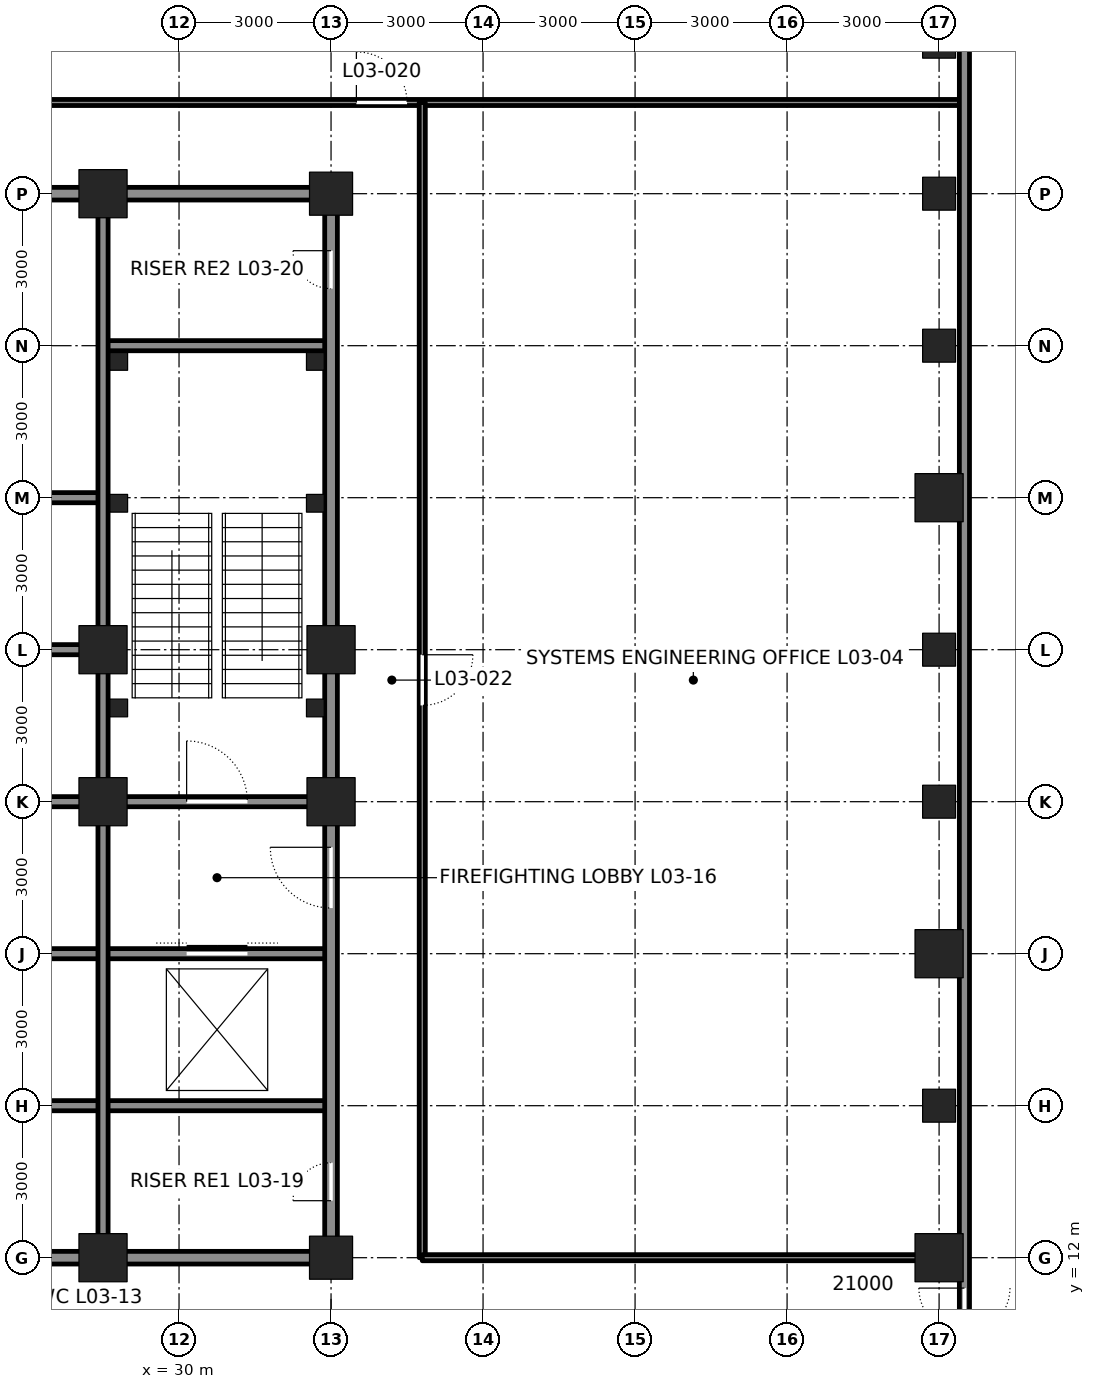
"""IFC4 building model, lengths in metres.
Left out: names, types, materials, properties, quantities, classifications, styles, units other than length and angle.
Written with IfcOpenShell. Run it as: python <this file> out.ifc"""

import sys

from ifc_helpers import new_model, si_unit, direction, frame, frame_2d, origin, origin_2d, place, context, subcontext, project, spatial, rectangle, hollow_rectangle, extrude, element, fill, save


model = new_model("IFC4")
c1 = context("Model", 3, precision=1e-05, world=origin(), true_north=direction((0.0, 1.0)))
c2 = subcontext(c1, "Body", "Model", "MODEL_VIEW")
j1 = project(units=[si_unit("LENGTHUNIT", "METRE"), si_unit("PLANEANGLEUNIT", "RADIAN")], contexts=[c1])
p1 = place(None, origin())
s1 = spatial("IfcSite", under=j1, at=p1, CompositionType="ELEMENT")
p2 = place(p1, origin())
s2 = spatial("IfcBuilding", under=s1, at=p2, CompositionType="ELEMENT")
p3 = place(p2, frame((0.0, 0.0, 19.5)))
s3 = spatial("IfcBuildingStorey", under=s2, at=p3, CompositionType="ELEMENT", Elevation=19.5)
p4 = place(p3, frame((45.0, 12.0, 0.0), z_axis=(0.0, 0.0, 1.0), x_axis=(1.0, 0.0, 0.0)))
e1 = element("IfcColumn", 1, at=p4, inside=s3, PredefinedType="COLUMN", context=c2, shape_type="SweptSolid", body=[
    extrude(hollow_rectangle(XDim=0.95, YDim=0.95, WallThickness=0.11, at=origin_2d()), origin(), (0.0, 0.0, 1.0), 4.8),
])
p5 = place(p3, frame((45.0, 15.0, 0.0), z_axis=(0.0, 0.0, 1.0), x_axis=(1.0, 0.0, 0.0)))
e2 = element("IfcColumn", 2, at=p5, inside=s3, PredefinedType="COLUMN", context=c2, shape_type="SweptSolid", body=[
    extrude(hollow_rectangle(XDim=0.65, YDim=0.65, WallThickness=0.065, at=origin_2d()), origin(), (0.0, 0.0, 1.0), 4.8),
])
p6 = place(p3, frame((45.0, 18.0, 0.0), z_axis=(0.0, 0.0, 1.0), x_axis=(1.0, 0.0, 0.0)))
e3 = element("IfcColumn", 3, at=p6, inside=s3, PredefinedType="COLUMN", context=c2, shape_type="SweptSolid", body=[
    extrude(hollow_rectangle(XDim=0.95, YDim=0.95, WallThickness=0.11, at=origin_2d()), origin(), (0.0, 0.0, 1.0), 4.8),
])
for number, where, z_axis, x_axis in (
    (4, (45.0, 21.0, 0.0), (0.0, 0.0, 1.0), (1.0, 0.0, 0.0)),
    (5, (45.0, 24.0, 0.0), (0.0, 0.0, 1.0), (1.0, 0.0, 0.0)),
):
    element("IfcColumn", number, at=place(p3, frame(where, z_axis=z_axis, x_axis=x_axis)), inside=s3, PredefinedType="COLUMN", context=c2, shape_type="SweptSolid", body=[
        extrude(hollow_rectangle(XDim=0.65, YDim=0.65, WallThickness=0.065, at=origin_2d()), origin(), (0.0, 0.0, 1.0), 4.8),
    ])
p7 = place(p3, frame((45.0, 27.0, 0.0), z_axis=(0.0, 0.0, 1.0), x_axis=(1.0, 0.0, 0.0)))
e6 = element("IfcColumn", 6, at=p7, inside=s3, PredefinedType="COLUMN", context=c2, shape_type="SweptSolid", body=[
    extrude(hollow_rectangle(XDim=0.95, YDim=0.95, WallThickness=0.11, at=origin_2d()), origin(), (0.0, 0.0, 1.0), 4.8),
])
for number, where, z_axis, x_axis in (
    (7, (45.0, 30.0, 0.0), (0.0, 0.0, 1.0), (1.0, 0.0, 0.0)),
    (8, (45.0, 33.0, 0.0), (0.0, 0.0, 1.0), (1.0, 0.0, 0.0)),
    (9, (45.0, 36.0, 0.0), (0.0, 0.0, 1.0), (1.0, 0.0, 0.0)),
):
    element("IfcColumn", number, at=place(p3, frame(where, z_axis=z_axis, x_axis=x_axis)), inside=s3, PredefinedType="COLUMN", context=c2, shape_type="SweptSolid", body=[
        extrude(hollow_rectangle(XDim=0.65, YDim=0.65, WallThickness=0.065, at=origin_2d()), origin(), (0.0, 0.0, 1.0), 4.8),
    ])
p8 = place(p3, frame((28.5, 12.0, 0.0), z_axis=(0.0, 0.0, 1.0), x_axis=(1.0, 0.0, 0.0)))
e10 = element("IfcColumn", 10, at=p8, inside=s3, PredefinedType="COLUMN", context=c2, shape_type="SweptSolid", body=[
    extrude(hollow_rectangle(XDim=0.95, YDim=0.95, WallThickness=0.095, at=origin_2d()), origin(), (0.0, 0.0, 1.0), 4.8),
])
p9 = place(p3, frame((33.0, 12.0, 0.0), z_axis=(0.0, 0.0, 1.0), x_axis=(1.0, 0.0, 0.0)))
e11 = element("IfcColumn", 11, at=p9, inside=s3, PredefinedType="COLUMN", context=c2, shape_type="SweptSolid", body=[
    extrude(hollow_rectangle(XDim=0.85, YDim=0.85, WallThickness=0.085, at=origin_2d()), origin(), (0.0, 0.0, 1.0), 4.8),
])
p10 = place(p3, frame((28.5, 33.0, 0.0), z_axis=(0.0, 0.0, 1.0), x_axis=(1.0, 0.0, 0.0)))
e12 = element("IfcColumn", 12, at=p10, inside=s3, PredefinedType="COLUMN", context=c2, shape_type="SweptSolid", body=[
    extrude(hollow_rectangle(XDim=0.95, YDim=0.95, WallThickness=0.095, at=origin_2d()), origin(), (0.0, 0.0, 1.0), 4.8),
])
p11 = place(p3, frame((33.0, 33.0, 0.0), z_axis=(0.0, 0.0, 1.0), x_axis=(1.0, 0.0, 0.0)))
e13 = element("IfcColumn", 13, at=p11, inside=s3, PredefinedType="COLUMN", context=c2, shape_type="SweptSolid", body=[
    extrude(hollow_rectangle(XDim=0.85, YDim=0.85, WallThickness=0.085, at=origin_2d()), origin(), (0.0, 0.0, 1.0), 4.8),
])
for number, where, z_axis, x_axis in (
    (14, (33.0, 21.0, 0.0), (0.0, 0.0, 1.0), (1.0, 0.0, 0.0)),
    (15, (33.0, 24.0, 0.0), (0.0, 0.0, 1.0), (1.0, 0.0, 0.0)),
    (16, (28.5, 21.0, 0.0), (0.0, 0.0, 1.0), (1.0, 0.0, 0.0)),
    (17, (28.5, 24.0, 0.0), (0.0, 0.0, 1.0), (1.0, 0.0, 0.0)),
):
    element("IfcColumn", number, at=place(p3, frame(where, z_axis=z_axis, x_axis=x_axis)), inside=s3, PredefinedType="COLUMN", context=c2, shape_type="SweptSolid", body=[
        extrude(hollow_rectangle(XDim=0.95, YDim=0.95, WallThickness=0.095, at=origin_2d()), origin(), (0.0, 0.0, 1.0), 4.8),
    ])
p12 = place(p3, frame((25.75, 12.0, 0.0), z_axis=(0.0, 0.0, 1.0), x_axis=(1.0, 0.0, 0.0)))
e18 = element("IfcWall", 18, at=p12, inside=s3, PredefinedType="SOLIDWALL", context=c2, shape_type="SweptSolid", body=[
    extrude(rectangle(XDim=2.5, YDim=0.25, at=frame_2d((1.25, 0.0))), origin(), (0.0, 0.0, 1.0), 3.481),
])
p13 = place(p3, frame((28.75, 12.0, 0.0), z_axis=(0.0, 0.0, 1.0), x_axis=(1.0, 0.0, 0.0)))
e19 = element("IfcWall", 19, at=p13, inside=s3, PredefinedType="SOLIDWALL", context=c2, shape_type="SweptSolid", body=[
    extrude(rectangle(XDim=4.0, YDim=0.25, at=frame_2d((2.0, 0.0))), origin(), (0.0, 0.0, 1.0), 3.481),
])
p14 = place(p3, frame((25.5, 15.0, 0.0), z_axis=(0.0, 0.0, 1.0), x_axis=(1.0, 0.0, 0.0)))
e20 = element("IfcWall", 20, at=p14, inside=s3, PredefinedType="SOLIDWALL", context=c2, shape_type="SweptSolid", body=[
    extrude(rectangle(XDim=7.5, YDim=0.2, at=frame_2d((3.75, 0.0))), origin(), (0.0, 0.0, 1.0), 4.64),
])
p15 = place(p3, frame((25.5, 24.0, 0.0), z_axis=(0.0, 0.0, 1.0), x_axis=(1.0, 0.0, 0.0)))
e21 = element("IfcWall", 21, at=p15, inside=s3, PredefinedType="SOLIDWALL", context=c2, shape_type="SweptSolid", body=[
    extrude(rectangle(XDim=2.75, YDim=0.2, at=frame_2d((1.375, 0.0))), origin(), (0.0, 0.0, 1.0), 3.69),
])
p16 = place(p3, frame((25.5, 27.0, 0.0), z_axis=(0.0, 0.0, 1.0), x_axis=(1.0, 0.0, 0.0)))
e22 = element("IfcWall", 22, at=p16, inside=s3, PredefinedType="SOLIDWALL", context=c2, shape_type="SweptSolid", body=[
    extrude(rectangle(XDim=3.0, YDim=0.2, at=frame_2d((1.5, 0.0))), origin(), (0.0, 0.0, 1.0), 4.64),
])
p17 = place(p3, frame((28.5, 30.0, 0.0), z_axis=(0.0, 0.0, 1.0), x_axis=(1.0, 0.0, 0.0)))
e23 = element("IfcWall", 23, at=p17, inside=s3, PredefinedType="SOLIDWALL", context=c2, shape_type="SweptSolid", body=[
    extrude(rectangle(XDim=4.5, YDim=0.2, at=frame_2d((2.25, 0.0))), origin(), (0.0, 0.0, 1.0), 4.64),
])
p18 = place(p3, frame((25.75, 33.0, 0.0), z_axis=(0.0, 0.0, 1.0), x_axis=(1.0, 0.0, 0.0)))
e24 = element("IfcWall", 24, at=p18, inside=s3, PredefinedType="SOLIDWALL", context=c2, shape_type="SweptSolid", body=[
    extrude(rectangle(XDim=2.5, YDim=0.25, at=frame_2d((1.25, 0.0))), origin(), (0.0, 0.0, 1.0), 3.481),
])
p19 = place(p3, frame((28.75, 33.0, 0.0), z_axis=(0.0, 0.0, 1.0), x_axis=(1.0, 0.0, 0.0)))
e25 = element("IfcWall", 25, at=p19, inside=s3, PredefinedType="SOLIDWALL", context=c2, shape_type="SweptSolid", body=[
    extrude(rectangle(XDim=4.0, YDim=0.25, at=frame_2d((2.0, 0.0))), origin(), (0.0, 0.0, 1.0), 3.481),
])
p20 = place(p3, frame((25.5, 18.0, 0.0), z_axis=(0.0, 0.0, 1.0), x_axis=(1.0, 0.0, 0.0)))
e26 = element("IfcWall", 26, at=p20, inside=s3, PredefinedType="SOLIDWALL", context=c2, shape_type="SweptSolid", body=[
    extrude(rectangle(XDim=7.5, YDim=0.2, at=frame_2d((3.75, 0.0))), origin(), (0.0, 0.0, 1.0), 4.64),
])
p21 = place(p20, frame((4.65, 0.0, 0.0)))
e27 = element("IfcOpeningElement", 27, at=p21, cuts=e26, PredefinedType="OPENING", context=c2, shape_type="SweptSolid", body=[
    extrude(rectangle(XDim=1.2, YDim=2.1, at=frame_2d((0.6, 1.05))), frame((0.0, 0.11, 0.0), z_axis=(0.0, -1.0, 0.0), x_axis=(1.0, 0.0, 0.0)), (0.0, 0.0, 1.0), 0.22),
])
p22 = place(p3, frame((25.5, 21.0, 0.0), z_axis=(0.0, 0.0, 1.0), x_axis=(1.0, 0.0, 0.0)))
e28 = element("IfcWall", 28, at=p22, inside=s3, PredefinedType="SOLIDWALL", context=c2, shape_type="SweptSolid", body=[
    extrude(rectangle(XDim=2.75, YDim=0.2, at=frame_2d((1.375, 0.0))), origin(), (0.0, 0.0, 1.0), 3.69),
])
p23 = place(p3, frame((28.75, 21.0, 0.0), z_axis=(0.0, 0.0, 1.0), x_axis=(1.0, 0.0, 0.0)))
e29 = element("IfcWall", 29, at=p23, inside=s3, PredefinedType="SOLIDWALL", context=c2, shape_type="SweptSolid", body=[
    extrude(rectangle(XDim=4.0, YDim=0.2, at=frame_2d((2.0, 0.0))), origin(), (0.0, 0.0, 1.0), 3.69),
])
p24 = place(p23, frame((1.4, 0.0, 0.0)))
e30 = element("IfcOpeningElement", 30, at=p24, cuts=e29, PredefinedType="OPENING", context=c2, shape_type="SweptSolid", body=[
    extrude(rectangle(XDim=1.2, YDim=2.1, at=frame_2d((0.6, 1.05))), frame((0.0, 0.11, 0.0), z_axis=(0.0, -1.0, 0.0), x_axis=(1.0, 0.0, 0.0)), (0.0, 0.0, 1.0), 0.22),
])
p25 = place(p3, frame((28.5, 12.25, 0.0), z_axis=(0.0, 0.0, 1.0), x_axis=(0.0, 1.0, 0.0)))
e31 = element("IfcWall", 31, at=p25, inside=s3, PredefinedType="SOLIDWALL", context=c2, shape_type="SweptSolid", body=[
    extrude(rectangle(XDim=8.5, YDim=0.2, at=frame_2d((4.25, 0.0))), origin(), (0.0, 0.0, 1.0), 3.713),
])
p26 = place(p3, frame((28.5, 21.25, 0.0), z_axis=(0.0, 0.0, 1.0), x_axis=(0.0, 1.0, 0.0)))
e32 = element("IfcWall", 32, at=p26, inside=s3, PredefinedType="SOLIDWALL", context=c2, shape_type="SweptSolid", body=[
    extrude(rectangle(XDim=2.5, YDim=0.2, at=frame_2d((1.25, 0.0))), origin(), (0.0, 0.0, 1.0), 3.713),
])
p27 = place(p3, frame((28.5, 24.25, 0.0), z_axis=(0.0, 0.0, 1.0), x_axis=(0.0, 1.0, 0.0)))
e33 = element("IfcWall", 33, at=p27, inside=s3, PredefinedType="SOLIDWALL", context=c2, shape_type="SweptSolid", body=[
    extrude(rectangle(XDim=8.5, YDim=0.2, at=frame_2d((4.25, 0.0))), origin(), (0.0, 0.0, 1.0), 3.713),
])
p28 = place(p3, frame((33.0, 12.25, 0.0), z_axis=(0.0, 0.0, 1.0), x_axis=(0.0, 1.0, 0.0)))
e34 = element("IfcWall", 34, at=p28, inside=s3, PredefinedType="SOLIDWALL", context=c2, shape_type="SweptSolid", body=[
    extrude(rectangle(XDim=8.5, YDim=0.25, at=frame_2d((4.25, 0.0))), origin(), (0.0, 0.0, 1.0), 3.413),
])
p29 = place(p28, frame((6.65, 0.0, 0.0)))
e35 = element("IfcOpeningElement", 35, at=p29, cuts=e34, PredefinedType="OPENING", context=c2, shape_type="SweptSolid", body=[
    extrude(rectangle(XDim=1.2, YDim=2.1, at=frame_2d((0.6, 1.05))), frame((0.0, 0.135, 0.0), z_axis=(0.0, -1.0, 0.0), x_axis=(1.0, 0.0, 0.0)), (0.0, 0.0, 1.0), 0.27),
])
p30 = place(p28, frame((0.875, 0.0, 0.0)))
e36 = element("IfcOpeningElement", 36, at=p30, cuts=e34, PredefinedType="OPENING", context=c2, shape_type="SweptSolid", body=[
    extrude(rectangle(XDim=0.75, YDim=2.1, at=frame_2d((0.375, 1.05))), frame((0.0, 0.135, 0.0), z_axis=(0.0, -1.0, 0.0), x_axis=(1.0, 0.0, 0.0)), (0.0, 0.0, 1.0), 0.27),
])
p31 = place(p3, frame((33.0, 21.25, 0.0), z_axis=(0.0, 0.0, 1.0), x_axis=(0.0, 1.0, 0.0)))
e37 = element("IfcWall", 37, at=p31, inside=s3, PredefinedType="SOLIDWALL", context=c2, shape_type="SweptSolid", body=[
    extrude(rectangle(XDim=2.5, YDim=0.25, at=frame_2d((1.25, 0.0))), origin(), (0.0, 0.0, 1.0), 3.413),
])
p32 = place(p3, frame((33.0, 24.25, 0.0), z_axis=(0.0, 0.0, 1.0), x_axis=(0.0, 1.0, 0.0)))
e38 = element("IfcWall", 38, at=p32, inside=s3, PredefinedType="SOLIDWALL", context=c2, shape_type="SweptSolid", body=[
    extrude(rectangle(XDim=8.5, YDim=0.25, at=frame_2d((4.25, 0.0))), origin(), (0.0, 0.0, 1.0), 3.413),
])
p33 = place(p32, frame((6.875, 0.0, 0.0)))
e39 = element("IfcOpeningElement", 39, at=p33, cuts=e38, PredefinedType="OPENING", context=c2, shape_type="SweptSolid", body=[
    extrude(rectangle(XDim=0.75, YDim=2.1, at=frame_2d((0.375, 1.05))), frame((0.0, 0.135, 0.0), z_axis=(0.0, -1.0, 0.0), x_axis=(1.0, 0.0, 0.0)), (0.0, 0.0, 1.0), 0.27),
])
p34 = place(p3, frame((22.5, 34.8, 0.0), z_axis=(0.0, 0.0, 1.0), x_axis=(1.0, 0.0, 0.0)))
e40 = element("IfcWall", 40, at=p34, inside=s3, PredefinedType="PARTITIONING", context=c2, shape_type="SweptSolid", body=[
    extrude(rectangle(XDim=23.0, YDim=0.12, at=frame_2d((11.5, 0.0))), origin(), (0.0, 0.0, 1.0), 4.34),
])
p35 = place(p34, frame((11.0, 0.0, 0.0)))
e41 = element("IfcOpeningElement", 41, at=p35, cuts=e40, PredefinedType="OPENING", context=c2, shape_type="SweptSolid", body=[
    extrude(rectangle(XDim=1.0, YDim=2.4, at=frame_2d((0.5, 1.2))), frame((0.0, 0.07, 0.0), z_axis=(0.0, -1.0, 0.0), x_axis=(1.0, 0.0, 0.0)), (0.0, 0.0, 1.0), 0.14),
])
p36 = place(p3, frame((34.8, 12.0, 0.0), z_axis=(0.0, 0.0, 1.0), x_axis=(0.0, 1.0, 0.0)))
e42 = element("IfcWall", 42, at=p36, inside=s3, PredefinedType="PARTITIONING", context=c2, shape_type="SweptSolid", body=[
    extrude(rectangle(XDim=22.8, YDim=0.12, at=frame_2d((11.4, 0.0))), origin(), (0.0, 0.0, 1.0), 4.34),
])
p37 = place(p36, frame((10.9, 0.0, 0.0)))
e43 = element("IfcOpeningElement", 43, at=p37, cuts=e42, PredefinedType="OPENING", context=c2, shape_type="SweptSolid", body=[
    extrude(rectangle(XDim=1.0, YDim=2.4, at=frame_2d((0.5, 1.2))), frame((0.0, 0.07, 0.0), z_axis=(0.0, -1.0, 0.0), x_axis=(1.0, 0.0, 0.0)), (0.0, 0.0, 1.0), 0.14),
])
p38 = place(p3, frame((34.8, 12.0, 0.0), z_axis=(0.0, 0.0, 1.0), x_axis=(1.0, 0.0, 0.0)))
e44 = element("IfcWall", 44, at=p38, inside=s3, PredefinedType="PARTITIONING", context=c2, shape_type="SweptSolid", body=[
    extrude(rectangle(XDim=10.7, YDim=0.12, at=frame_2d((5.35, 0.0))), origin(), (0.0, 0.0, 1.0), 3.481),
])
p39 = place(p3, frame((45.5, -0.5, 0.0), z_axis=(0.0, 0.0, 1.0), x_axis=(0.0, 1.0, 0.0)))
e45 = element("IfcWall", 45, at=p39, inside=s3, PredefinedType="PARTITIONING", context=c2, shape_type="SweptSolid", body=[
    extrude(rectangle(XDim=46.018, YDim=0.2, at=frame_2d((23.009, 0.0))), origin(), (0.0, 0.0, 1.0), 4.64),
])
p40 = place(p39, frame((43.625, 0.0, 0.0)))
e46 = element("IfcOpeningElement", 46, at=p40, cuts=e45, PredefinedType="OPENING", context=c2, shape_type="SweptSolid", body=[
    extrude(rectangle(XDim=0.75, YDim=2.1, at=frame_2d((0.375, 1.05))), frame((0.0, 0.11, 0.0), z_axis=(0.0, -1.0, 0.0), x_axis=(1.0, 0.0, 0.0)), (0.0, 0.0, 1.0), 0.22),
])
p41 = place(p39, frame((10.1, 0.0, 0.0)))
e47 = element("IfcOpeningElement", 47, at=p41, cuts=e45, PredefinedType="OPENING", context=c2, shape_type="SweptSolid", body=[
    extrude(rectangle(XDim=1.8, YDim=2.4, at=frame_2d((0.9, 1.2))), frame((0.0, 0.11, 0.0), z_axis=(0.0, -1.0, 0.0), x_axis=(1.0, 0.0, 0.0)), (0.0, 0.0, 1.0), 0.22),
])
for number, where, z_axis, x_axis in (
    (48, (28.81, 29.69, 0.0), (0.0, 0.0, 1.0), (1.0, 0.0, 0.0)),
    (49, (32.69, 29.69, 0.0), (0.0, 0.0, 1.0), (1.0, 0.0, 0.0)),
    (50, (28.81, 26.89, 0.0), (0.0, 0.0, 1.0), (1.0, 0.0, 0.0)),
    (51, (32.69, 26.89, 0.0), (0.0, 0.0, 1.0), (1.0, 0.0, 0.0)),
    (52, (28.81, 22.85, 0.0), (0.0, 0.0, 1.0), (1.0, 0.0, 0.0)),
    (53, (32.69, 22.85, 0.0), (0.0, 0.0, 1.0), (1.0, 0.0, 0.0)),
):
    element("IfcColumn", number, at=place(p3, frame(where, z_axis=z_axis, x_axis=x_axis)), inside=s3, PredefinedType="COLUMN", context=c2, shape_type="SweptSolid", body=[
        extrude(hollow_rectangle(XDim=0.35, YDim=0.35, WallThickness=0.035, at=origin_2d()), origin(), (0.0, 0.0, 1.0), 4.8),
    ])
p42 = place(p24, origin())
e54 = element("IfcDoor", 54, at=p42, inside=s3, OperationType="SINGLE_SWING_LEFT", PredefinedType="DOOR", context=c2, shape_type="SweptSolid", body=[
    extrude(rectangle(XDim=1.2, YDim=2.1, at=frame_2d((0.6, 1.05))), frame((0.0, 0.025, 0.0), z_axis=(0.0, -1.0, 0.0), x_axis=(1.0, 0.0, 0.0)), (0.0, 0.0, 1.0), 0.05),
])
fill(e30, e54)
p43 = place(p29, origin())
e55 = element("IfcDoor", 55, at=p43, inside=s3, OperationType="SINGLE_SWING_RIGHT", PredefinedType="DOOR", context=c2, shape_type="SweptSolid", body=[
    extrude(rectangle(XDim=1.2, YDim=2.1, at=frame_2d((0.6, 1.05))), frame((0.0, 0.025, 0.0), z_axis=(0.0, -1.0, 0.0), x_axis=(1.0, 0.0, 0.0)), (0.0, 0.0, 1.0), 0.05),
])
fill(e35, e55)
p44 = place(p21, origin())
e56 = element("IfcDoor", 56, at=p44, inside=s3, OperationType="DOUBLE_DOOR_SLIDING", PredefinedType="DOOR", context=c2, shape_type="SweptSolid", body=[
    extrude(rectangle(XDim=1.2, YDim=2.1, at=frame_2d((0.6, 1.05))), frame((0.0, 0.025, 0.0), z_axis=(0.0, -1.0, 0.0), x_axis=(1.0, 0.0, 0.0)), (0.0, 0.0, 1.0), 0.05),
])
fill(e27, e56)
p45 = place(p30, origin())
e57 = element("IfcDoor", 57, at=p45, inside=s3, OperationType="SINGLE_SWING_LEFT", PredefinedType="DOOR", context=c2, shape_type="SweptSolid", body=[
    extrude(rectangle(XDim=0.75, YDim=2.1, at=frame_2d((0.375, 1.05))), frame((0.0, 0.025, 0.0), z_axis=(0.0, -1.0, 0.0), x_axis=(1.0, 0.0, 0.0)), (0.0, 0.0, 1.0), 0.05),
])
fill(e36, e57)
p46 = place(p33, origin())
e58 = element("IfcDoor", 58, at=p46, inside=s3, OperationType="SINGLE_SWING_RIGHT", PredefinedType="DOOR", context=c2, shape_type="SweptSolid", body=[
    extrude(rectangle(XDim=0.75, YDim=2.1, at=frame_2d((0.375, 1.05))), frame((0.0, 0.025, 0.0), z_axis=(0.0, -1.0, 0.0), x_axis=(1.0, 0.0, 0.0)), (0.0, 0.0, 1.0), 0.05),
])
fill(e39, e58)
p47 = place(p35, origin())
e59 = element("IfcDoor", 59, at=p47, inside=s3, OperationType="SINGLE_SWING_LEFT", PredefinedType="DOOR", context=c2, shape_type="SweptSolid", body=[
    extrude(rectangle(XDim=1.0, YDim=2.4, at=frame_2d((0.5, 1.2))), frame((0.0, 0.025, 0.0), z_axis=(0.0, -1.0, 0.0), x_axis=(1.0, 0.0, 0.0)), (0.0, 0.0, 1.0), 0.05),
])
fill(e41, e59)
p48 = place(p37, frame((1.0, 0.0, 0.0), z_axis=(0.0, 0.0, 1.0), x_axis=(-1.0, 0.0, 0.0)))
e60 = element("IfcDoor", 60, at=p48, inside=s3, OperationType="SINGLE_SWING_LEFT", PredefinedType="DOOR", context=c2, shape_type="SweptSolid", body=[
    extrude(rectangle(XDim=1.0, YDim=2.4, at=frame_2d((0.5, 1.2))), frame((0.0, 0.025, 0.0), z_axis=(0.0, -1.0, 0.0), x_axis=(1.0, 0.0, 0.0)), (0.0, 0.0, 1.0), 0.05),
])
fill(e43, e60)
p49 = place(p41, origin())
e61 = element("IfcDoor", 61, at=p49, inside=s3, OperationType="DOUBLE_DOOR_DOUBLE_SWING", PredefinedType="DOOR", context=c2, shape_type="SweptSolid", body=[
    extrude(rectangle(XDim=1.8, YDim=2.4, at=frame_2d((0.9, 1.2))), frame((0.0, 0.025, 0.0), z_axis=(0.0, -1.0, 0.0), x_axis=(1.0, 0.0, 0.0)), (0.0, 0.0, 1.0), 0.05),
])
fill(e47, e61)
save(model, sys.argv[1])
